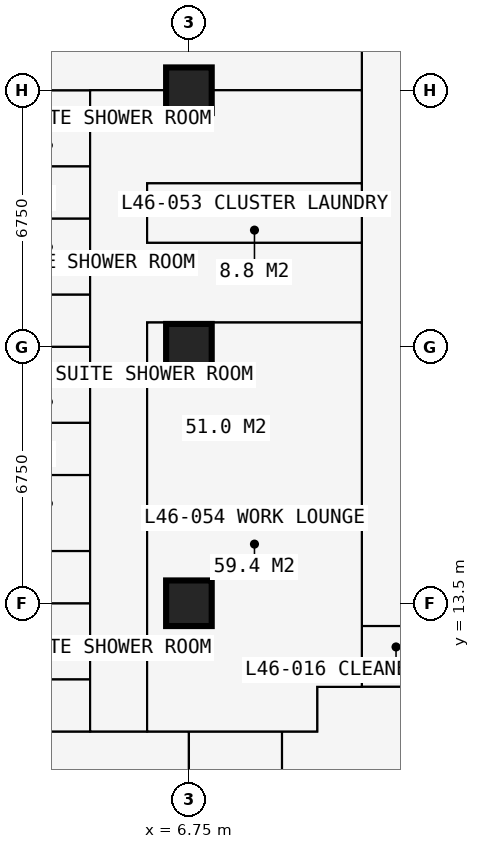
"""IFC4 building model, lengths in metres.
Left out: names, types, materials, properties, quantities, classifications, styles, units other than length and angle.
Written with IfcOpenShell. Run it as: python <this file> out.ifc"""

import sys

from ifc_helpers import new_model, si_unit, direction, frame, frame_2d, origin, origin_2d, place, context, subcontext, project, spatial, rectangle, extrude, element, fill, save


model = new_model("IFC4")
c1 = context("Model", 3, precision=1e-05, world=origin(), true_north=direction((0.0, 1.0)))
c2 = subcontext(c1, "Body", "Model", "MODEL_VIEW")
j1 = project(units=[si_unit("LENGTHUNIT", "METRE"), si_unit("PLANEANGLEUNIT", "RADIAN")], contexts=[c1])
p1 = place(None, origin())
s1 = spatial("IfcSite", under=j1, at=p1, CompositionType="ELEMENT")
p2 = place(p1, origin())
s2 = spatial("IfcBuilding", under=s1, at=p2, CompositionType="ELEMENT")
p3 = place(p2, frame((0.0, 0.0, 171.0)))
s3 = spatial("IfcBuildingStorey", under=s2, at=p3, CompositionType="ELEMENT", Elevation=171.0)
for number, where, z_axis, x_axis in (
    (1, (6.75, 13.5, 0.0), (0.0, 0.0, 1.0), (1.0, 0.0, 0.0)),
    (2, (6.75, 20.25, 0.0), (0.0, 0.0, 1.0), (1.0, 0.0, 0.0)),
    (3, (6.75, 27.0, 0.0), (0.0, 0.0, 1.0), (1.0, 0.0, 0.0)),
):
    element("IfcColumn", number, at=place(p3, frame(where, z_axis=z_axis, x_axis=x_axis)), inside=s3, PredefinedType="COLUMN", context=c2, shape_type="SweptSolid", body=[
        extrude(rectangle(XDim=1.2, YDim=1.2, at=origin_2d()), origin(), (0.0, 0.0, 1.0), 3.6),
    ])
p4 = place(p3, frame((-0.734, 10.125, 0.0), z_axis=(0.0, 0.0, 1.0), x_axis=(1.0, 0.0, 0.0)))
e4 = element("IfcWall", 4, at=p4, inside=s3, PredefinedType="PARTITIONING", context=c2, shape_type="SweptSolid", body=[
    extrude(rectangle(XDim=10.859, YDim=0.15, at=frame_2d((5.429, 0.0))), origin(), (0.0, 0.0, 1.0), 3.375),
])
p5 = place(p4, frame((8.234, 0.0, 0.0)))
e5 = element("IfcOpeningElement", 5, at=p5, cuts=e4, PredefinedType="OPENING", context=c2, shape_type="SweptSolid", body=[
    extrude(rectangle(XDim=0.95, YDim=2.2, at=frame_2d((0.475, 1.1))), frame((0.0, 0.085, 0.0), z_axis=(0.0, -1.0, 0.0), x_axis=(1.0, 0.0, 0.0)), (0.0, 0.0, 1.0), 0.17),
])
p6 = place(p3, frame((-0.734, 13.5, 0.0), z_axis=(0.0, 0.0, 1.0), x_axis=(1.0, 0.0, 0.0)))
e6 = element("IfcWall", 6, at=p6, inside=s3, PredefinedType="PARTITIONING", context=c2, shape_type="SweptSolid", body=[
    extrude(rectangle(XDim=4.884, YDim=0.175, at=frame_2d((2.442, 0.0))), origin(), (0.0, 0.0, 1.0), 2.877),
])
p7 = place(p3, frame((-0.734, 16.875, 0.0), z_axis=(0.0, 0.0, 1.0), x_axis=(1.0, 0.0, 0.0)))
e7 = element("IfcWall", 7, at=p7, inside=s3, PredefinedType="PARTITIONING", context=c2, shape_type="SweptSolid", body=[
    extrude(rectangle(XDim=4.884, YDim=0.175, at=frame_2d((2.442, 0.0))), origin(), (0.0, 0.0, 1.0), 3.375),
])
p8 = place(p3, frame((-0.734, 20.25, 0.0), z_axis=(0.0, 0.0, 1.0), x_axis=(1.0, 0.0, 0.0)))
e8 = element("IfcWall", 8, at=p8, inside=s3, PredefinedType="PARTITIONING", context=c2, shape_type="SweptSolid", body=[
    extrude(rectangle(XDim=4.884, YDim=0.175, at=frame_2d((2.442, 0.0))), origin(), (0.0, 0.0, 1.0), 2.877),
])
p9 = place(p3, frame((-0.734, 23.625, 0.0), z_axis=(0.0, 0.0, 1.0), x_axis=(1.0, 0.0, 0.0)))
e9 = element("IfcWall", 9, at=p9, inside=s3, PredefinedType="PARTITIONING", context=c2, shape_type="SweptSolid", body=[
    extrude(rectangle(XDim=4.884, YDim=0.175, at=frame_2d((2.442, 0.0))), origin(), (0.0, 0.0, 1.0), 3.375),
])
p10 = place(p3, frame((-0.734, 27.0, 0.0), z_axis=(0.0, 0.0, 1.0), x_axis=(1.0, 0.0, 0.0)))
e10 = element("IfcWall", 10, at=p10, inside=s3, PredefinedType="PARTITIONING", context=c2, shape_type="SweptSolid", body=[
    extrude(rectangle(XDim=12.034, YDim=0.15, at=frame_2d((6.017, 0.0))), origin(), (0.0, 0.0, 1.0), 2.806),
])
p11 = place(p10, frame((8.084, 0.0, 0.0)))
e11 = element("IfcOpeningElement", 11, at=p11, cuts=e10, PredefinedType="OPENING", context=c2, shape_type="SweptSolid", body=[
    extrude(rectangle(XDim=1.0, YDim=2.2, at=frame_2d((0.5, 1.1))), frame((0.0, 0.085, 0.0), z_axis=(0.0, -1.0, 0.0), x_axis=(1.0, 0.0, 0.0)), (0.0, 0.0, 1.0), 0.17),
])
p12 = place(p3, frame((1.95, 11.5, 0.0), z_axis=(0.0, 0.0, 1.0), x_axis=(1.0, 0.0, 0.0)))
e12 = element("IfcWall", 12, at=p12, inside=s3, PredefinedType="PARTITIONING", context=c2, shape_type="SweptSolid", body=[
    extrude(rectangle(XDim=2.2, YDim=0.1, at=frame_2d((1.1, 0.0))), origin(), (0.0, 0.0, 1.0), 3.375),
])
p13 = place(p12, frame((0.65, 0.0, 0.0)))
e13 = element("IfcOpeningElement", 13, at=p13, cuts=e12, PredefinedType="OPENING", context=c2, shape_type="SweptSolid", body=[
    extrude(rectangle(XDim=0.9, YDim=2.2, at=frame_2d((0.45, 1.1))), frame((0.0, 0.06, 0.0), z_axis=(0.0, -1.0, 0.0), x_axis=(1.0, 0.0, 0.0)), (0.0, 0.0, 1.0), 0.12),
])
p14 = place(p3, frame((1.95, 14.875, 0.0), z_axis=(0.0, 0.0, 1.0), x_axis=(1.0, 0.0, 0.0)))
e14 = element("IfcWall", 14, at=p14, inside=s3, PredefinedType="PARTITIONING", context=c2, shape_type="SweptSolid", body=[
    extrude(rectangle(XDim=2.2, YDim=0.1, at=frame_2d((1.1, 0.0))), origin(), (0.0, 0.0, 1.0), 3.375),
])
p15 = place(p14, frame((0.65, 0.0, 0.0)))
e15 = element("IfcOpeningElement", 15, at=p15, cuts=e14, PredefinedType="OPENING", context=c2, shape_type="SweptSolid", body=[
    extrude(rectangle(XDim=0.9, YDim=2.2, at=frame_2d((0.45, 1.1))), frame((0.0, 0.06, 0.0), z_axis=(0.0, -1.0, 0.0), x_axis=(1.0, 0.0, 0.0)), (0.0, 0.0, 1.0), 0.12),
])
p16 = place(p3, frame((1.95, 18.25, 0.0), z_axis=(0.0, 0.0, 1.0), x_axis=(1.0, 0.0, 0.0)))
e16 = element("IfcWall", 16, at=p16, inside=s3, PredefinedType="PARTITIONING", context=c2, shape_type="SweptSolid", body=[
    extrude(rectangle(XDim=2.2, YDim=0.1, at=frame_2d((1.1, 0.0))), origin(), (0.0, 0.0, 1.0), 3.375),
])
p17 = place(p16, frame((0.65, 0.0, 0.0)))
e17 = element("IfcOpeningElement", 17, at=p17, cuts=e16, PredefinedType="OPENING", context=c2, shape_type="SweptSolid", body=[
    extrude(rectangle(XDim=0.9, YDim=2.2, at=frame_2d((0.45, 1.1))), frame((0.0, 0.06, 0.0), z_axis=(0.0, -1.0, 0.0), x_axis=(1.0, 0.0, 0.0)), (0.0, 0.0, 1.0), 0.12),
])
p18 = place(p3, frame((1.95, 21.625, 0.0), z_axis=(0.0, 0.0, 1.0), x_axis=(1.0, 0.0, 0.0)))
e18 = element("IfcWall", 18, at=p18, inside=s3, PredefinedType="PARTITIONING", context=c2, shape_type="SweptSolid", body=[
    extrude(rectangle(XDim=2.2, YDim=0.1, at=frame_2d((1.1, 0.0))), origin(), (0.0, 0.0, 1.0), 3.375),
])
p19 = place(p18, frame((0.65, 0.0, 0.0)))
e19 = element("IfcOpeningElement", 19, at=p19, cuts=e18, PredefinedType="OPENING", context=c2, shape_type="SweptSolid", body=[
    extrude(rectangle(XDim=0.9, YDim=2.2, at=frame_2d((0.45, 1.1))), frame((0.0, 0.06, 0.0), z_axis=(0.0, -1.0, 0.0), x_axis=(1.0, 0.0, 0.0)), (0.0, 0.0, 1.0), 0.12),
])
p20 = place(p3, frame((1.95, 25.0, 0.0), z_axis=(0.0, 0.0, 1.0), x_axis=(1.0, 0.0, 0.0)))
e20 = element("IfcWall", 20, at=p20, inside=s3, PredefinedType="PARTITIONING", context=c2, shape_type="SweptSolid", body=[
    extrude(rectangle(XDim=2.2, YDim=0.1, at=frame_2d((1.1, 0.0))), origin(), (0.0, 0.0, 1.0), 3.375),
])
p21 = place(p20, frame((0.65, 0.0, 0.0)))
e21 = element("IfcOpeningElement", 21, at=p21, cuts=e20, PredefinedType="OPENING", context=c2, shape_type="SweptSolid", body=[
    extrude(rectangle(XDim=0.9, YDim=2.2, at=frame_2d((0.45, 1.1))), frame((0.0, 0.06, 0.0), z_axis=(0.0, -1.0, 0.0), x_axis=(1.0, 0.0, 0.0)), (0.0, 0.0, 1.0), 0.12),
])
p22 = place(p3, frame((4.15, 10.125, 0.0), z_axis=(0.0, 0.0, 1.0), x_axis=(0.0, 1.0, 0.0)))
e22 = element("IfcWall", 22, at=p22, inside=s3, PredefinedType="PARTITIONING", context=c2, shape_type="SweptSolid", body=[
    extrude(rectangle(XDim=16.875, YDim=0.1, at=frame_2d((8.438, 0.0))), origin(), (0.0, 0.0, 1.0), 3.375),
])
p23 = place(p22, frame((0.2, 0.0, 0.0)))
e23 = element("IfcOpeningElement", 23, at=p23, cuts=e22, PredefinedType="OPENING", context=c2, shape_type="SweptSolid", body=[
    extrude(rectangle(XDim=0.95, YDim=2.2, at=frame_2d((0.475, 1.1))), frame((0.0, 0.06, 0.0), z_axis=(0.0, -1.0, 0.0), x_axis=(1.0, 0.0, 0.0)), (0.0, 0.0, 1.0), 0.12),
])
p24 = place(p22, frame((3.625, 0.0, 0.0)))
e24 = element("IfcOpeningElement", 24, at=p24, cuts=e22, PredefinedType="OPENING", context=c2, shape_type="SweptSolid", body=[
    extrude(rectangle(XDim=0.95, YDim=2.2, at=frame_2d((0.475, 1.1))), frame((0.0, 0.06, 0.0), z_axis=(0.0, -1.0, 0.0), x_axis=(1.0, 0.0, 0.0)), (0.0, 0.0, 1.0), 0.12),
])
p25 = place(p22, frame((7.0, 0.0, 0.0)))
e25 = element("IfcOpeningElement", 25, at=p25, cuts=e22, PredefinedType="OPENING", context=c2, shape_type="SweptSolid", body=[
    extrude(rectangle(XDim=0.95, YDim=2.2, at=frame_2d((0.475, 1.1))), frame((0.0, 0.06, 0.0), z_axis=(0.0, -1.0, 0.0), x_axis=(1.0, 0.0, 0.0)), (0.0, 0.0, 1.0), 0.12),
])
p26 = place(p22, frame((10.375, 0.0, 0.0)))
e26 = element("IfcOpeningElement", 26, at=p26, cuts=e22, PredefinedType="OPENING", context=c2, shape_type="SweptSolid", body=[
    extrude(rectangle(XDim=0.95, YDim=2.2, at=frame_2d((0.475, 1.1))), frame((0.0, 0.06, 0.0), z_axis=(0.0, -1.0, 0.0), x_axis=(1.0, 0.0, 0.0)), (0.0, 0.0, 1.0), 0.12),
])
p27 = place(p22, frame((13.75, 0.0, 0.0)))
e27 = element("IfcOpeningElement", 27, at=p27, cuts=e22, PredefinedType="OPENING", context=c2, shape_type="SweptSolid", body=[
    extrude(rectangle(XDim=0.95, YDim=2.2, at=frame_2d((0.475, 1.1))), frame((0.0, 0.06, 0.0), z_axis=(0.0, -1.0, 0.0), x_axis=(1.0, 0.0, 0.0)), (0.0, 0.0, 1.0), 0.12),
])
p28 = place(p3, frame((5.65, 10.125, 0.0), z_axis=(0.0, 0.0, 1.0), x_axis=(0.0, 1.0, 0.0)))
e28 = element("IfcWall", 28, at=p28, inside=s3, PredefinedType="PARTITIONING", context=c2, shape_type="SweptSolid", body=[
    extrude(rectangle(XDim=10.762, YDim=0.15, at=frame_2d((5.381, 0.0))), origin(), (0.0, 0.0, 1.0), 3.375),
])
p29 = place(p3, frame((5.65, 20.887, 0.0), z_axis=(0.0, 0.0, 1.0), x_axis=(1.0, 0.0, 0.0)))
e29 = element("IfcWall", 29, at=p29, inside=s3, PredefinedType="PARTITIONING", context=c2, shape_type="SweptSolid", body=[
    extrude(rectangle(XDim=5.65, YDim=0.15, at=frame_2d((2.825, 0.0))), origin(), (0.0, 0.0, 1.0), 3.375),
])
p30 = place(p3, frame((5.65, 22.988, 0.0), z_axis=(0.0, 0.0, 1.0), x_axis=(0.0, 1.0, 0.0)))
e30 = element("IfcWall", 30, at=p30, inside=s3, PredefinedType="PARTITIONING", context=c2, shape_type="SweptSolid", body=[
    extrude(rectangle(XDim=1.562, YDim=0.15, at=frame_2d((0.781, 0.0))), origin(), (0.0, 0.0, 1.0), 3.375),
])
p31 = place(p3, frame((5.65, 22.988, 0.0), z_axis=(0.0, 0.0, 1.0), x_axis=(1.0, 0.0, 0.0)))
e31 = element("IfcWall", 31, at=p31, inside=s3, PredefinedType="PARTITIONING", context=c2, shape_type="SweptSolid", body=[
    extrude(rectangle(XDim=5.65, YDim=0.15, at=frame_2d((2.825, 0.0))), origin(), (0.0, 0.0, 1.0), 3.375),
])
p32 = place(p31, frame((2.35, 0.0, 0.0)))
e32 = element("IfcOpeningElement", 32, at=p32, cuts=e31, PredefinedType="OPENING", context=c2, shape_type="SweptSolid", body=[
    extrude(rectangle(XDim=0.95, YDim=2.2, at=frame_2d((0.475, 1.1))), frame((0.0, 0.085, 0.0), z_axis=(0.0, -1.0, 0.0), x_axis=(1.0, 0.0, 0.0)), (0.0, 0.0, 1.0), 0.17),
])
p33 = place(p3, frame((5.65, 24.55, 0.0), z_axis=(0.0, 0.0, 1.0), x_axis=(1.0, 0.0, 0.0)))
e33 = element("IfcWall", 33, at=p33, inside=s3, PredefinedType="PARTITIONING", context=c2, shape_type="SweptSolid", body=[
    extrude(rectangle(XDim=5.65, YDim=0.15, at=frame_2d((2.825, 0.0))), origin(), (0.0, 0.0, 1.0), 3.375),
])
p34 = place(p3, frame((6.75, -0.734, 0.0), z_axis=(0.0, 0.0, 1.0), x_axis=(0.0, 1.0, 0.0)))
e34 = element("IfcWall", 34, at=p34, inside=s3, PredefinedType="PARTITIONING", context=c2, shape_type="SweptSolid", body=[
    extrude(rectangle(XDim=10.859, YDim=0.15, at=frame_2d((5.429, 0.0))), origin(), (0.0, 0.0, 1.0), 2.877),
])
p35 = place(p34, frame((8.084, 0.0, 0.0)))
e35 = element("IfcOpeningElement", 35, at=p35, cuts=e34, PredefinedType="OPENING", context=c2, shape_type="SweptSolid", body=[
    extrude(rectangle(XDim=1.0, YDim=2.2, at=frame_2d((0.5, 1.1))), frame((0.0, 0.085, 0.0), z_axis=(0.0, -1.0, 0.0), x_axis=(1.0, 0.0, 0.0)), (0.0, 0.0, 1.0), 0.17),
])
p36 = place(p3, frame((9.2, 5.65, 0.0), z_axis=(0.0, 0.0, 1.0), x_axis=(0.0, 1.0, 0.0)))
e36 = element("IfcWall", 36, at=p36, inside=s3, PredefinedType="PARTITIONING", context=c2, shape_type="SweptSolid", body=[
    extrude(rectangle(XDim=4.475, YDim=0.15, at=frame_2d((2.238, 0.0))), origin(), (0.0, 0.0, 1.0), 3.375),
])
p37 = place(p3, frame((10.125, 10.125, 0.0), z_axis=(0.0, 0.0, 1.0), x_axis=(0.0, 1.0, 0.0)))
e37 = element("IfcWall", 37, at=p37, inside=s3, PredefinedType="PARTITIONING", context=c2, shape_type="SweptSolid", body=[
    extrude(rectangle(XDim=1.175, YDim=0.15, at=frame_2d((0.587, 0.0))), origin(), (0.0, 0.0, 1.0), 3.375),
])
p38 = place(p3, frame((10.125, 11.3, 0.0), z_axis=(0.0, 0.0, 1.0), x_axis=(1.0, 0.0, 0.0)))
e38 = element("IfcWall", 38, at=p38, inside=s3, PredefinedType="PARTITIONING", context=c2, shape_type="SweptSolid", body=[
    extrude(rectangle(XDim=21.475, YDim=0.15, at=frame_2d((10.738, 0.0))), origin(), (0.0, 0.0, 1.0), 3.375),
])
p39 = place(p38, frame((11.312, 0.0, 0.0)))
e39 = element("IfcOpeningElement", 39, at=p39, cuts=e38, PredefinedType="OPENING", context=c2, shape_type="SweptSolid", body=[
    extrude(rectangle(XDim=1.0, YDim=2.2, at=frame_2d((0.5, 1.1))), frame((0.0, 0.085, 0.0), z_axis=(0.0, -1.0, 0.0), x_axis=(1.0, 0.0, 0.0)), (0.0, 0.0, 1.0), 0.17),
])
p40 = place(p3, frame((11.3, 11.3, 0.0), z_axis=(0.0, 0.0, 1.0), x_axis=(0.0, 1.0, 0.0)))
e40 = element("IfcWall", 40, at=p40, inside=s3, PredefinedType="PARTITIONING", context=c2, shape_type="SweptSolid", body=[
    extrude(rectangle(XDim=19.075, YDim=0.15, at=frame_2d((9.538, 0.0))), origin(), (0.0, 0.0, 1.0), 3.375),
])
p41 = place(p40, frame((13.95, 0.0, 0.0)))
e41 = element("IfcOpeningElement", 41, at=p41, cuts=e40, PredefinedType="OPENING", context=c2, shape_type="SweptSolid", body=[
    extrude(rectangle(XDim=1.0, YDim=2.2, at=frame_2d((0.5, 1.1))), frame((0.0, 0.085, 0.0), z_axis=(0.0, -1.0, 0.0), x_axis=(1.0, 0.0, 0.0)), (0.0, 0.0, 1.0), 0.17),
])
p42 = place(p3, frame((11.3, 12.9, 0.0), z_axis=(0.0, 0.0, 1.0), x_axis=(1.0, 0.0, 0.0)))
e42 = element("IfcWall", 42, at=p42, inside=s3, PredefinedType="PARTITIONING", context=c2, shape_type="SweptSolid", body=[
    extrude(rectangle(XDim=1.8, YDim=0.15, at=frame_2d((0.9, 0.0))), origin(), (0.0, 0.0, 1.0), 2.806),
])
p43 = place(p42, frame((0.4, 0.0, 0.0)))
e43 = element("IfcOpeningElement", 43, at=p43, cuts=e42, PredefinedType="OPENING", context=c2, shape_type="SweptSolid", body=[
    extrude(rectangle(XDim=0.95, YDim=2.2, at=frame_2d((0.475, 1.1))), frame((0.0, 0.085, 0.0), z_axis=(0.0, -1.0, 0.0), x_axis=(1.0, 0.0, 0.0)), (0.0, 0.0, 1.0), 0.17),
])
p44 = place(p43, origin())
e44 = element("IfcDoor", 44, at=p44, inside=s3, OperationType="SINGLE_SWING_LEFT", PredefinedType="DOOR", context=c2, shape_type="SweptSolid", body=[
    extrude(rectangle(XDim=0.95, YDim=2.2, at=frame_2d((0.475, 1.1))), frame((0.0, 0.025, 0.0), z_axis=(0.0, -1.0, 0.0), x_axis=(1.0, 0.0, 0.0)), (0.0, 0.0, 1.0), 0.05),
])
fill(e43, e44)
p45 = place(p23, origin())
e45 = element("IfcDoor", 45, at=p45, inside=s3, OperationType="SINGLE_SWING_LEFT", PredefinedType="DOOR", context=c2, shape_type="SweptSolid", body=[
    extrude(rectangle(XDim=0.95, YDim=2.2, at=frame_2d((0.475, 1.1))), frame((0.0, 0.025, 0.0), z_axis=(0.0, -1.0, 0.0), x_axis=(1.0, 0.0, 0.0)), (0.0, 0.0, 1.0), 0.05),
])
fill(e23, e45)
p46 = place(p13, origin())
e46 = element("IfcDoor", 46, at=p46, inside=s3, OperationType="SINGLE_SWING_RIGHT", PredefinedType="DOOR", context=c2, shape_type="SweptSolid", body=[
    extrude(rectangle(XDim=0.9, YDim=2.2, at=frame_2d((0.45, 1.1))), frame((0.0, 0.025, 0.0), z_axis=(0.0, -1.0, 0.0), x_axis=(1.0, 0.0, 0.0)), (0.0, 0.0, 1.0), 0.05),
])
fill(e13, e46)
p47 = place(p24, origin())
e47 = element("IfcDoor", 47, at=p47, inside=s3, OperationType="SINGLE_SWING_LEFT", PredefinedType="DOOR", context=c2, shape_type="SweptSolid", body=[
    extrude(rectangle(XDim=0.95, YDim=2.2, at=frame_2d((0.475, 1.1))), frame((0.0, 0.025, 0.0), z_axis=(0.0, -1.0, 0.0), x_axis=(1.0, 0.0, 0.0)), (0.0, 0.0, 1.0), 0.05),
])
fill(e24, e47)
p48 = place(p15, origin())
e48 = element("IfcDoor", 48, at=p48, inside=s3, OperationType="SINGLE_SWING_RIGHT", PredefinedType="DOOR", context=c2, shape_type="SweptSolid", body=[
    extrude(rectangle(XDim=0.9, YDim=2.2, at=frame_2d((0.45, 1.1))), frame((0.0, 0.025, 0.0), z_axis=(0.0, -1.0, 0.0), x_axis=(1.0, 0.0, 0.0)), (0.0, 0.0, 1.0), 0.05),
])
fill(e15, e48)
p49 = place(p25, origin())
e49 = element("IfcDoor", 49, at=p49, inside=s3, OperationType="SINGLE_SWING_LEFT", PredefinedType="DOOR", context=c2, shape_type="SweptSolid", body=[
    extrude(rectangle(XDim=0.95, YDim=2.2, at=frame_2d((0.475, 1.1))), frame((0.0, 0.025, 0.0), z_axis=(0.0, -1.0, 0.0), x_axis=(1.0, 0.0, 0.0)), (0.0, 0.0, 1.0), 0.05),
])
fill(e25, e49)
p50 = place(p17, origin())
e50 = element("IfcDoor", 50, at=p50, inside=s3, OperationType="SINGLE_SWING_RIGHT", PredefinedType="DOOR", context=c2, shape_type="SweptSolid", body=[
    extrude(rectangle(XDim=0.9, YDim=2.2, at=frame_2d((0.45, 1.1))), frame((0.0, 0.025, 0.0), z_axis=(0.0, -1.0, 0.0), x_axis=(1.0, 0.0, 0.0)), (0.0, 0.0, 1.0), 0.05),
])
fill(e17, e50)
p51 = place(p26, origin())
e51 = element("IfcDoor", 51, at=p51, inside=s3, OperationType="SINGLE_SWING_LEFT", PredefinedType="DOOR", context=c2, shape_type="SweptSolid", body=[
    extrude(rectangle(XDim=0.95, YDim=2.2, at=frame_2d((0.475, 1.1))), frame((0.0, 0.025, 0.0), z_axis=(0.0, -1.0, 0.0), x_axis=(1.0, 0.0, 0.0)), (0.0, 0.0, 1.0), 0.05),
])
fill(e26, e51)
p52 = place(p19, origin())
e52 = element("IfcDoor", 52, at=p52, inside=s3, OperationType="SINGLE_SWING_RIGHT", PredefinedType="DOOR", context=c2, shape_type="SweptSolid", body=[
    extrude(rectangle(XDim=0.9, YDim=2.2, at=frame_2d((0.45, 1.1))), frame((0.0, 0.025, 0.0), z_axis=(0.0, -1.0, 0.0), x_axis=(1.0, 0.0, 0.0)), (0.0, 0.0, 1.0), 0.05),
])
fill(e19, e52)
p53 = place(p27, origin())
e53 = element("IfcDoor", 53, at=p53, inside=s3, OperationType="SINGLE_SWING_LEFT", PredefinedType="DOOR", context=c2, shape_type="SweptSolid", body=[
    extrude(rectangle(XDim=0.95, YDim=2.2, at=frame_2d((0.475, 1.1))), frame((0.0, 0.025, 0.0), z_axis=(0.0, -1.0, 0.0), x_axis=(1.0, 0.0, 0.0)), (0.0, 0.0, 1.0), 0.05),
])
fill(e27, e53)
p54 = place(p21, origin())
e54 = element("IfcDoor", 54, at=p54, inside=s3, OperationType="SINGLE_SWING_RIGHT", PredefinedType="DOOR", context=c2, shape_type="SweptSolid", body=[
    extrude(rectangle(XDim=0.9, YDim=2.2, at=frame_2d((0.45, 1.1))), frame((0.0, 0.025, 0.0), z_axis=(0.0, -1.0, 0.0), x_axis=(1.0, 0.0, 0.0)), (0.0, 0.0, 1.0), 0.05),
])
fill(e21, e54)
p55 = place(p11, origin())
e55 = element("IfcDoor", 55, at=p55, inside=s3, OperationType="SINGLE_SWING_LEFT", PredefinedType="DOOR", context=c2, shape_type="SweptSolid", body=[
    extrude(rectangle(XDim=1.0, YDim=2.2, at=frame_2d((0.5, 1.1))), frame((0.0, 0.025, 0.0), z_axis=(0.0, -1.0, 0.0), x_axis=(1.0, 0.0, 0.0)), (0.0, 0.0, 1.0), 0.05),
])
fill(e11, e55)
p56 = place(p41, origin())
e56 = element("IfcDoor", 56, at=p56, inside=s3, OperationType="SINGLE_SWING_LEFT", PredefinedType="DOOR", context=c2, shape_type="SweptSolid", body=[
    extrude(rectangle(XDim=1.0, YDim=2.2, at=frame_2d((0.5, 1.1))), frame((0.0, 0.025, 0.0), z_axis=(0.0, -1.0, 0.0), x_axis=(1.0, 0.0, 0.0)), (0.0, 0.0, 1.0), 0.05),
])
fill(e41, e56)
p57 = place(p32, origin())
e57 = element("IfcDoor", 57, at=p57, inside=s3, OperationType="SINGLE_SWING_LEFT", PredefinedType="DOOR", context=c2, shape_type="SweptSolid", body=[
    extrude(rectangle(XDim=0.95, YDim=2.2, at=frame_2d((0.475, 1.1))), frame((0.0, 0.025, 0.0), z_axis=(0.0, -1.0, 0.0), x_axis=(1.0, 0.0, 0.0)), (0.0, 0.0, 1.0), 0.05),
])
fill(e32, e57)
p58 = place(p5, origin())
e58 = element("IfcDoor", 58, at=p58, inside=s3, OperationType="SINGLE_SWING_LEFT", PredefinedType="DOOR", context=c2, shape_type="SweptSolid", body=[
    extrude(rectangle(XDim=0.95, YDim=2.2, at=frame_2d((0.475, 1.1))), frame((0.0, 0.025, 0.0), z_axis=(0.0, -1.0, 0.0), x_axis=(1.0, 0.0, 0.0)), (0.0, 0.0, 1.0), 0.05),
])
fill(e5, e58)
save(model, sys.argv[1])
